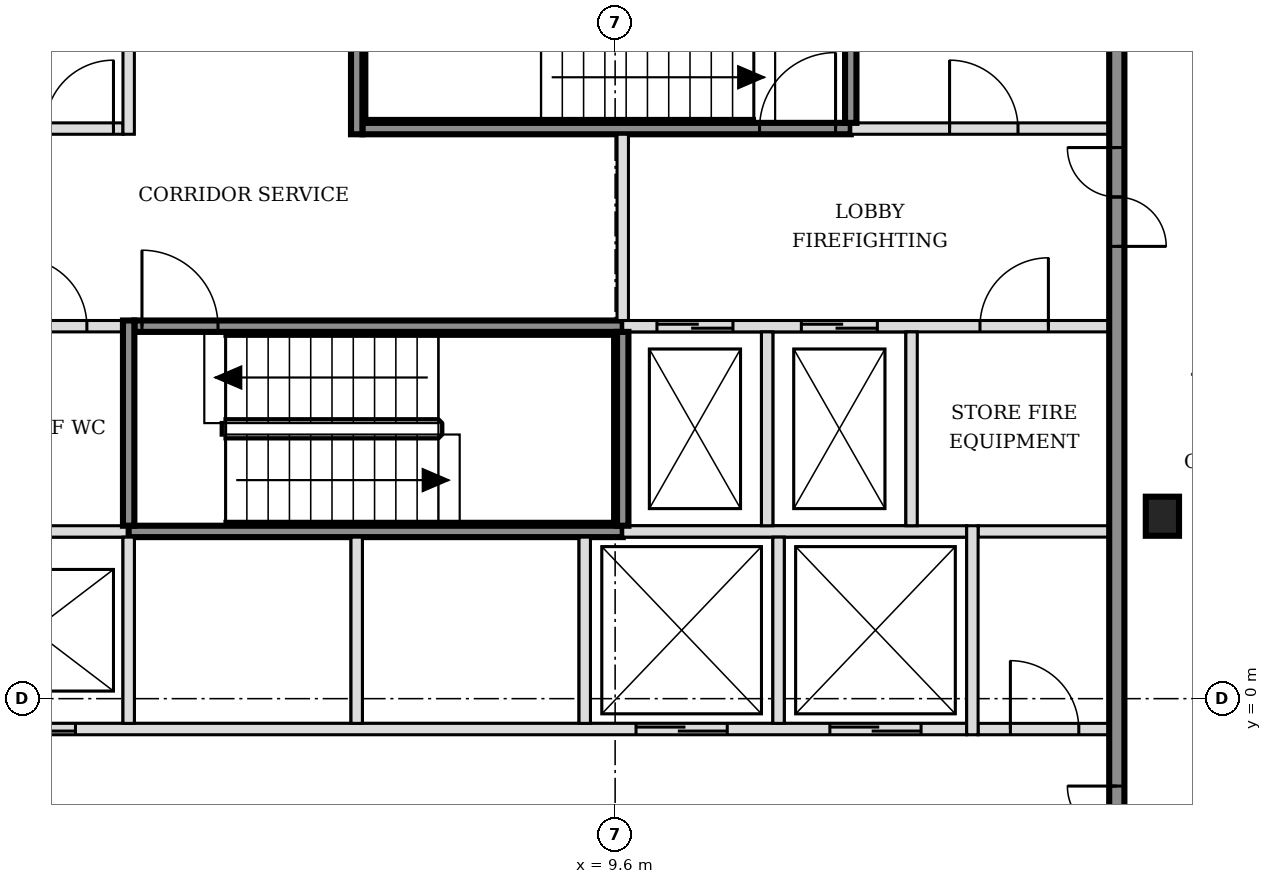
"""IFC4 building model, lengths in metres.
Left out: names, types, materials, properties, quantities, classifications, styles, units other than length and angle.
Written with IfcOpenShell. Run it as: python <this file> out.ifc"""

import sys

from ifc_helpers import new_model, si_unit, direction, frame, frame_2d, origin, origin_2d, place, context, subcontext, project, spatial, rectangle, i_section, extrude, element, fill, save


model = new_model("IFC4")
c1 = context("Model", 3, precision=1e-05, world=origin(), true_north=direction((0.0, 1.0)))
c2 = subcontext(c1, "Body", "Model", "MODEL_VIEW")
j1 = project(units=[si_unit("LENGTHUNIT", "METRE"), si_unit("PLANEANGLEUNIT", "RADIAN")], contexts=[c1])
p1 = place(None, origin())
s1 = spatial("IfcSite", under=j1, at=p1, CompositionType="ELEMENT")
p2 = place(p1, origin())
s2 = spatial("IfcBuilding", under=s1, at=p2, CompositionType="ELEMENT")
p3 = place(p2, frame((0.0, 0.0, 65.4)))
s3 = spatial("IfcBuildingStorey", under=s2, at=p3, CompositionType="ELEMENT", Elevation=65.4)
p4 = place(p3, frame((16.8, 2.4, -0.15), z_axis=(0.0, 0.0, 1.0), x_axis=(1.0, 0.0, 0.0)))
e1 = element("IfcColumn", 1, at=p4, inside=s3, PredefinedType="COLUMN", context=c2, shape_type="SweptSolid", body=[
    extrude(i_section(OverallWidth=0.437, OverallDepth=0.514, WebThickness=0.061, FlangeThickness=0.097, FilletRadius=0.015, at=origin_2d()), origin(), (0.0, 0.0, 1.0), 3.6),
])
p5 = place(p3, frame((-1.7, -0.4, 0.0), z_axis=(0.0, 0.0, 1.0), x_axis=(1.0, 0.0, 0.0)))
e2 = element("IfcWall", 2, at=p5, inside=s3, PredefinedType="SOLIDWALL", context=c2, shape_type="SweptSolid", body=[
    extrude(rectangle(XDim=15.925, YDim=0.15, at=frame_2d((7.962, 0.0))), origin(), (0.0, 0.0, 1.0), 3.45),
])
p6 = place(p5, frame((0.6, 0.0, 0.0)))
e3 = element("IfcOpeningElement", 3, at=p6, cuts=e2, PredefinedType="OPENING", context=c2, shape_type="SweptSolid", body=[
    extrude(rectangle(XDim=1.1, YDim=2.1, at=frame_2d((0.55, 1.05))), frame((0.0, 0.085, 0.0), z_axis=(0.0, -1.0, 0.0), x_axis=(1.0, 0.0, 0.0)), (0.0, 0.0, 1.0), 0.17),
])
p7 = place(p5, frame((3.1, 0.0, 0.0)))
e4 = element("IfcOpeningElement", 4, at=p7, cuts=e2, PredefinedType="OPENING", context=c2, shape_type="SweptSolid", body=[
    extrude(rectangle(XDim=1.1, YDim=2.1, at=frame_2d((0.55, 1.05))), frame((0.0, 0.085, 0.0), z_axis=(0.0, -1.0, 0.0), x_axis=(1.0, 0.0, 0.0)), (0.0, 0.0, 1.0), 0.17),
])
p8 = place(p5, frame((11.575, 0.0, 0.0)))
e5 = element("IfcOpeningElement", 5, at=p8, cuts=e2, PredefinedType="OPENING", context=c2, shape_type="SweptSolid", body=[
    extrude(rectangle(XDim=1.2, YDim=2.1, at=frame_2d((0.6, 1.05))), frame((0.0, 0.085, 0.0), z_axis=(0.0, -1.0, 0.0), x_axis=(1.0, 0.0, 0.0)), (0.0, 0.0, 1.0), 0.17),
])
p9 = place(p5, frame((14.125, 0.0, 0.0)))
e6 = element("IfcOpeningElement", 6, at=p9, cuts=e2, PredefinedType="OPENING", context=c2, shape_type="SweptSolid", body=[
    extrude(rectangle(XDim=1.2, YDim=2.1, at=frame_2d((0.6, 1.05))), frame((0.0, 0.085, 0.0), z_axis=(0.0, -1.0, 0.0), x_axis=(1.0, 0.0, 0.0)), (0.0, 0.0, 1.0), 0.17),
])
p10 = place(p3, frame((14.375, -0.4, 0.0), z_axis=(0.0, 0.0, 1.0), x_axis=(1.0, 0.0, 0.0)))
e7 = element("IfcWall", 7, at=p10, inside=s3, PredefinedType="PARTITIONING", context=c2, shape_type="SweptSolid", body=[
    extrude(rectangle(XDim=1.725, YDim=0.15, at=frame_2d((0.863, 0.0))), origin(), (0.0, 0.0, 1.0), 3.45),
])
p11 = place(p10, frame((0.425, 0.0, 0.0)))
e8 = element("IfcOpeningElement", 8, at=p11, cuts=e7, PredefinedType="OPENING", context=c2, shape_type="SweptSolid", body=[
    extrude(rectangle(XDim=0.9, YDim=2.1, at=frame_2d((0.45, 1.05))), frame((0.0, 0.085, 0.0), z_axis=(0.0, -1.0, 0.0), x_axis=(1.0, 0.0, 0.0)), (0.0, 0.0, 1.0), 0.17),
])
p12 = place(p3, frame((-1.7, 2.2, 0.0), z_axis=(0.0, 0.0, 1.0), x_axis=(1.0, 0.0, 0.0)))
e9 = element("IfcWall", 9, at=p12, inside=s3, PredefinedType="SOLIDWALL", context=c2, shape_type="SweptSolid", body=[
    extrude(rectangle(XDim=4.9, YDim=0.15, at=frame_2d((2.45, 0.0))), origin(), (0.0, 0.0, 1.0), 3.45),
])
p13 = place(p3, frame((3.2, 2.2, 0.0), z_axis=(0.0, 0.0, 1.0), x_axis=(1.0, 0.0, 0.0)))
e10 = element("IfcWall", 10, at=p13, inside=s3, PredefinedType="SOLIDWALL", context=c2, shape_type="SweptSolid", body=[
    extrude(rectangle(XDim=6.5, YDim=0.15, at=frame_2d((3.25, 0.0))), origin(), (0.0, 0.0, 1.0), 3.45),
])
p14 = place(p3, frame((9.7, 2.2, 0.0), z_axis=(0.0, 0.0, 1.0), x_axis=(1.0, 0.0, 0.0)))
e11 = element("IfcWall", 11, at=p14, inside=s3, PredefinedType="SOLIDWALL", context=c2, shape_type="SweptSolid", body=[
    extrude(rectangle(XDim=4.525, YDim=0.15, at=frame_2d((2.263, 0.0))), origin(), (0.0, 0.0, 1.0), 3.45),
])
p15 = place(p3, frame((14.375, 2.2, 0.0), z_axis=(0.0, 0.0, 1.0), x_axis=(1.0, 0.0, 0.0)))
e12 = element("IfcWall", 12, at=p15, inside=s3, PredefinedType="PARTITIONING", context=c2, shape_type="SweptSolid", body=[
    extrude(rectangle(XDim=1.725, YDim=0.15, at=frame_2d((0.863, 0.0))), origin(), (0.0, 0.0, 1.0), 3.45),
])
p16 = place(p3, frame((-1.7, 4.9, 0.0), z_axis=(0.0, 0.0, 1.0), x_axis=(1.0, 0.0, 0.0)))
e13 = element("IfcWall", 13, at=p16, inside=s3, PredefinedType="PARTITIONING", context=c2, shape_type="SweptSolid", body=[
    extrude(rectangle(XDim=4.825, YDim=0.15, at=frame_2d((2.413, 0.0))), origin(), (0.0, 0.0, 1.0), 3.45),
])
p17 = place(p16, frame((0.95, 0.0, 0.0)))
e14 = element("IfcOpeningElement", 14, at=p17, cuts=e13, PredefinedType="OPENING", context=c2, shape_type="SweptSolid", body=[
    extrude(rectangle(XDim=0.9, YDim=2.1, at=frame_2d((0.45, 1.05))), frame((0.0, 0.085, 0.0), z_axis=(0.0, -1.0, 0.0), x_axis=(1.0, 0.0, 0.0)), (0.0, 0.0, 1.0), 0.17),
])
p18 = place(p16, frame((3.45, 0.0, 0.0)))
e15 = element("IfcOpeningElement", 15, at=p18, cuts=e13, PredefinedType="OPENING", context=c2, shape_type="SweptSolid", body=[
    extrude(rectangle(XDim=0.9, YDim=2.1, at=frame_2d((0.45, 1.05))), frame((0.0, 0.085, 0.0), z_axis=(0.0, -1.0, 0.0), x_axis=(1.0, 0.0, 0.0)), (0.0, 0.0, 1.0), 0.17),
])
p19 = place(p3, frame((3.275, 4.9, 0.0), z_axis=(0.0, 0.0, 1.0), x_axis=(1.0, 0.0, 0.0)))
e16 = element("IfcWall", 16, at=p19, inside=s3, PredefinedType="SOLIDWALL", context=c2, shape_type="SweptSolid", body=[
    extrude(rectangle(XDim=6.425, YDim=0.15, at=frame_2d((3.212, 0.0))), origin(), (0.0, 0.0, 1.0), 3.45),
])
p20 = place(p19, frame((0.1, 0.0, 0.0)))
e17 = element("IfcOpeningElement", 17, at=p20, cuts=e16, PredefinedType="OPENING", context=c2, shape_type="SweptSolid", body=[
    extrude(rectangle(XDim=1.0, YDim=2.1, at=frame_2d((0.5, 1.05))), frame((0.0, 0.085, 0.0), z_axis=(0.0, -1.0, 0.0), x_axis=(1.0, 0.0, 0.0)), (0.0, 0.0, 1.0), 0.17),
])
p21 = place(p3, frame((9.7, 4.9, 0.0), z_axis=(0.0, 0.0, 1.0), x_axis=(1.0, 0.0, 0.0)))
e18 = element("IfcWall", 18, at=p21, inside=s3, PredefinedType="SOLIDWALL", context=c2, shape_type="SweptSolid", body=[
    extrude(rectangle(XDim=6.4, YDim=0.15, at=frame_2d((3.2, 0.0))), origin(), (0.0, 0.0, 1.0), 3.45),
])
p22 = place(p21, frame((0.45, 0.0, 0.0)))
e19 = element("IfcOpeningElement", 19, at=p22, cuts=e18, PredefinedType="OPENING", context=c2, shape_type="SweptSolid", body=[
    extrude(rectangle(XDim=1.0, YDim=2.1, at=frame_2d((0.5, 1.05))), frame((0.0, 0.085, 0.0), z_axis=(0.0, -1.0, 0.0), x_axis=(1.0, 0.0, 0.0)), (0.0, 0.0, 1.0), 0.17),
])
p23 = place(p21, frame((2.35, 0.0, 0.0)))
e20 = element("IfcOpeningElement", 20, at=p23, cuts=e18, PredefinedType="OPENING", context=c2, shape_type="SweptSolid", body=[
    extrude(rectangle(XDim=1.0, YDim=2.1, at=frame_2d((0.5, 1.05))), frame((0.0, 0.085, 0.0), z_axis=(0.0, -1.0, 0.0), x_axis=(1.0, 0.0, 0.0)), (0.0, 0.0, 1.0), 0.17),
])
p24 = place(p21, frame((4.7, 0.0, 0.0)))
e21 = element("IfcOpeningElement", 21, at=p24, cuts=e18, PredefinedType="OPENING", context=c2, shape_type="SweptSolid", body=[
    extrude(rectangle(XDim=0.9, YDim=2.1, at=frame_2d((0.45, 1.05))), frame((0.0, 0.085, 0.0), z_axis=(0.0, -1.0, 0.0), x_axis=(1.0, 0.0, 0.0)), (0.0, 0.0, 1.0), 0.17),
])
p25 = place(p3, frame((-1.7, 7.5, 0.0), z_axis=(0.0, 0.0, 1.0), x_axis=(1.0, 0.0, 0.0)))
e22 = element("IfcWall", 22, at=p25, inside=s3, PredefinedType="PARTITIONING", context=c2, shape_type="SweptSolid", body=[
    extrude(rectangle(XDim=4.825, YDim=0.15, at=frame_2d((2.413, 0.0))), origin(), (0.0, 0.0, 1.0), 3.45),
])
p26 = place(p25, frame((0.1, 0.0, 0.0)))
e23 = element("IfcOpeningElement", 23, at=p26, cuts=e22, PredefinedType="OPENING", context=c2, shape_type="SweptSolid", body=[
    extrude(rectangle(XDim=0.9, YDim=2.1, at=frame_2d((0.45, 1.05))), frame((0.0, 0.085, 0.0), z_axis=(0.0, -1.0, 0.0), x_axis=(1.0, 0.0, 0.0)), (0.0, 0.0, 1.0), 0.17),
])
p27 = place(p25, frame((1.95, 0.0, 0.0)))
e24 = element("IfcOpeningElement", 24, at=p27, cuts=e22, PredefinedType="OPENING", context=c2, shape_type="SweptSolid", body=[
    extrude(rectangle(XDim=0.9, YDim=2.1, at=frame_2d((0.45, 1.05))), frame((0.0, 0.085, 0.0), z_axis=(0.0, -1.0, 0.0), x_axis=(1.0, 0.0, 0.0)), (0.0, 0.0, 1.0), 0.17),
])
p28 = place(p25, frame((3.8, 0.0, 0.0)))
e25 = element("IfcOpeningElement", 25, at=p28, cuts=e22, PredefinedType="OPENING", context=c2, shape_type="SweptSolid", body=[
    extrude(rectangle(XDim=0.9, YDim=2.1, at=frame_2d((0.45, 1.05))), frame((0.0, 0.085, 0.0), z_axis=(0.0, -1.0, 0.0), x_axis=(1.0, 0.0, 0.0)), (0.0, 0.0, 1.0), 0.17),
])
p29 = place(p3, frame((6.275, 7.5, 0.0), z_axis=(0.0, 0.0, 1.0), x_axis=(1.0, 0.0, 0.0)))
e26 = element("IfcWall", 26, at=p29, inside=s3, PredefinedType="SOLIDWALL", context=c2, shape_type="SweptSolid", body=[
    extrude(rectangle(XDim=6.425, YDim=0.15, at=frame_2d((3.212, 0.0))), origin(), (0.0, 0.0, 1.0), 3.45),
])
p30 = place(p29, frame((5.225, 0.0, 0.0)))
e27 = element("IfcOpeningElement", 27, at=p30, cuts=e26, PredefinedType="OPENING", context=c2, shape_type="SweptSolid", body=[
    extrude(rectangle(XDim=1.0, YDim=2.1, at=frame_2d((0.5, 1.05))), frame((0.0, 0.085, 0.0), z_axis=(0.0, -1.0, 0.0), x_axis=(1.0, 0.0, 0.0)), (0.0, 0.0, 1.0), 0.17),
])
p31 = place(p3, frame((12.7, 7.5, 0.0), z_axis=(0.0, 0.0, 1.0), x_axis=(1.0, 0.0, 0.0)))
e28 = element("IfcWall", 28, at=p31, inside=s3, PredefinedType="SOLIDWALL", context=c2, shape_type="SweptSolid", body=[
    extrude(rectangle(XDim=3.4, YDim=0.15, at=frame_2d((1.7, 0.0))), origin(), (0.0, 0.0, 1.0), 3.45),
])
p32 = place(p31, frame((1.3, 0.0, 0.0)))
e29 = element("IfcOpeningElement", 29, at=p32, cuts=e28, PredefinedType="OPENING", context=c2, shape_type="SweptSolid", body=[
    extrude(rectangle(XDim=0.9, YDim=2.1, at=frame_2d((0.45, 1.05))), frame((0.0, 0.085, 0.0), z_axis=(0.0, -1.0, 0.0), x_axis=(1.0, 0.0, 0.0)), (0.0, 0.0, 1.0), 0.17),
])
p33 = place(p3, frame((3.2, -0.325, 0.0), z_axis=(0.0, 0.0, 1.0), x_axis=(0.0, 1.0, 0.0)))
e30 = element("IfcWall", 30, at=p33, inside=s3, PredefinedType="SOLIDWALL", context=c2, shape_type="SweptSolid", body=[
    extrude(rectangle(XDim=2.45, YDim=0.15, at=frame_2d((1.225, 0.0))), origin(), (0.0, 0.0, 1.0), 3.45),
])
p34 = place(p3, frame((3.2, 2.275, 0.0), z_axis=(0.0, 0.0, 1.0), x_axis=(0.0, 1.0, 0.0)))
e31 = element("IfcWall", 31, at=p34, inside=s3, PredefinedType="SOLIDWALL", context=c2, shape_type="SweptSolid", body=[
    extrude(rectangle(XDim=2.7, YDim=0.15, at=frame_2d((1.35, 0.0))), origin(), (0.0, 0.0, 1.0), 3.45),
])
p35 = place(p3, frame((3.2, 7.425, 0.0), z_axis=(0.0, 0.0, 1.0), x_axis=(0.0, 1.0, 0.0)))
e32 = element("IfcWall", 32, at=p35, inside=s3, PredefinedType="PARTITIONING", context=c2, shape_type="SweptSolid", body=[
    extrude(rectangle(XDim=2.675, YDim=0.15, at=frame_2d((1.337, 0.0))), origin(), (0.0, 0.0, 1.0), 3.45),
])
p36 = place(p3, frame((6.2, -0.325, 0.0), z_axis=(0.0, 0.0, 1.0), x_axis=(0.0, 1.0, 0.0)))
e33 = element("IfcWall", 33, at=p36, inside=s3, PredefinedType="SOLIDWALL", context=c2, shape_type="SweptSolid", body=[
    extrude(rectangle(XDim=2.45, YDim=0.15, at=frame_2d((1.225, 0.0))), origin(), (0.0, 0.0, 1.0), 3.45),
])
p37 = place(p3, frame((6.2, 7.425, 0.0), z_axis=(0.0, 0.0, 1.0), x_axis=(0.0, 1.0, 0.0)))
e34 = element("IfcWall", 34, at=p37, inside=s3, PredefinedType="SOLIDWALL", context=c2, shape_type="SweptSolid", body=[
    extrude(rectangle(XDim=2.675, YDim=0.15, at=frame_2d((1.337, 0.0))), origin(), (0.0, 0.0, 1.0), 3.45),
])
p38 = place(p3, frame((9.2, -0.325, 0.0), z_axis=(0.0, 0.0, 1.0), x_axis=(0.0, 1.0, 0.0)))
e35 = element("IfcWall", 35, at=p38, inside=s3, PredefinedType="SOLIDWALL", context=c2, shape_type="SweptSolid", body=[
    extrude(rectangle(XDim=2.45, YDim=0.15, at=frame_2d((1.225, 0.0))), origin(), (0.0, 0.0, 1.0), 3.45),
])
p39 = place(p3, frame((9.7, 2.275, 0.0), z_axis=(0.0, 0.0, 1.0), x_axis=(0.0, 1.0, 0.0)))
e36 = element("IfcWall", 36, at=p39, inside=s3, PredefinedType="SOLIDWALL", context=c2, shape_type="SweptSolid", body=[
    extrude(rectangle(XDim=2.55, YDim=0.15, at=frame_2d((1.275, 0.0))), origin(), (0.0, 0.0, 1.0), 3.45),
])
p40 = place(p3, frame((9.7, 4.975, 0.0), z_axis=(0.0, 0.0, 1.0), x_axis=(0.0, 1.0, 0.0)))
e37 = element("IfcWall", 37, at=p40, inside=s3, PredefinedType="SOLIDWALL", context=c2, shape_type="SweptSolid", body=[
    extrude(rectangle(XDim=2.45, YDim=0.15, at=frame_2d((1.225, 0.0))), origin(), (0.0, 0.0, 1.0), 3.45),
])
p41 = place(p3, frame((11.6, 2.275, 0.0), z_axis=(0.0, 0.0, 1.0), x_axis=(0.0, 1.0, 0.0)))
e38 = element("IfcWall", 38, at=p41, inside=s3, PredefinedType="SOLIDWALL", context=c2, shape_type="SweptSolid", body=[
    extrude(rectangle(XDim=2.55, YDim=0.15, at=frame_2d((1.275, 0.0))), origin(), (0.0, 0.0, 1.0), 3.45),
])
p42 = place(p3, frame((11.75, -0.325, 0.0), z_axis=(0.0, 0.0, 1.0), x_axis=(0.0, 1.0, 0.0)))
e39 = element("IfcWall", 39, at=p42, inside=s3, PredefinedType="SOLIDWALL", context=c2, shape_type="SweptSolid", body=[
    extrude(rectangle(XDim=2.45, YDim=0.15, at=frame_2d((1.225, 0.0))), origin(), (0.0, 0.0, 1.0), 3.45),
])
p43 = place(p3, frame((12.7, 7.575, 0.0), z_axis=(0.0, 0.0, 1.0), x_axis=(0.0, 1.0, 0.0)))
e40 = element("IfcWall", 40, at=p43, inside=s3, PredefinedType="SOLIDWALL", context=c2, shape_type="SweptSolid", body=[
    extrude(rectangle(XDim=2.525, YDim=0.15, at=frame_2d((1.263, 0.0))), origin(), (0.0, 0.0, 1.0), 3.45),
])
p44 = place(p3, frame((13.5, 2.275, 0.0), z_axis=(0.0, 0.0, 1.0), x_axis=(0.0, 1.0, 0.0)))
e41 = element("IfcWall", 41, at=p44, inside=s3, PredefinedType="SOLIDWALL", context=c2, shape_type="SweptSolid", body=[
    extrude(rectangle(XDim=2.55, YDim=0.15, at=frame_2d((1.275, 0.0))), origin(), (0.0, 0.0, 1.0), 3.45),
])
p45 = place(p3, frame((14.3, -0.475, 0.0), z_axis=(0.0, 0.0, 1.0), x_axis=(0.0, 1.0, 0.0)))
e42 = element("IfcWall", 42, at=p45, inside=s3, PredefinedType="SOLIDWALL", context=c2, shape_type="SweptSolid", body=[
    extrude(rectangle(XDim=2.75, YDim=0.15, at=frame_2d((1.375, 0.0))), origin(), (0.0, 0.0, 1.0), 3.45),
])
p46 = place(p3, frame((16.2, -5.5, 0.0), z_axis=(0.0, 0.0, 1.0), x_axis=(0.0, 1.0, 0.0)))
e43 = element("IfcWall", 43, at=p46, inside=s3, PredefinedType="SOLIDWALL", context=c2, shape_type="SweptSolid", body=[
    extrude(rectangle(XDim=15.8, YDim=0.2, at=frame_2d((7.9, 0.0))), origin(), (0.0, 0.0, 1.0), 3.45),
])
p47 = place(p46, frame((3.05, 0.0, 0.0)))
e44 = element("IfcOpeningElement", 44, at=p47, cuts=e43, PredefinedType="OPENING", context=c2, shape_type="SweptSolid", body=[
    extrude(rectangle(XDim=1.3, YDim=2.1, at=frame_2d((0.65, 1.05))), frame((0.0, 0.11, 0.0), z_axis=(0.0, -1.0, 0.0), x_axis=(1.0, 0.0, 0.0)), (0.0, 0.0, 1.0), 0.22),
])
p48 = place(p46, frame((11.45, 0.0, 0.0)))
e45 = element("IfcOpeningElement", 45, at=p48, cuts=e43, PredefinedType="OPENING", context=c2, shape_type="SweptSolid", body=[
    extrude(rectangle(XDim=1.3, YDim=2.1, at=frame_2d((0.65, 1.05))), frame((0.0, 0.11, 0.0), z_axis=(0.0, -1.0, 0.0), x_axis=(1.0, 0.0, 0.0)), (0.0, 0.0, 1.0), 0.22),
])
p49 = place(p7, origin())
e46 = element("IfcDoor", 46, at=p49, inside=s3, OperationType="DOUBLE_DOOR_SLIDING", PredefinedType="DOOR", context=c2, shape_type="SweptSolid", body=[
    extrude(rectangle(XDim=1.1, YDim=2.1, at=frame_2d((0.55, 1.05))), frame((0.0, 0.025, 0.0), z_axis=(0.0, -1.0, 0.0), x_axis=(1.0, 0.0, 0.0)), (0.0, 0.0, 1.0), 0.05),
])
fill(e4, e46)
p50 = place(p8, origin())
e47 = element("IfcDoor", 47, at=p50, inside=s3, OperationType="DOUBLE_DOOR_SLIDING", PredefinedType="DOOR", context=c2, shape_type="SweptSolid", body=[
    extrude(rectangle(XDim=1.2, YDim=2.1, at=frame_2d((0.6, 1.05))), frame((0.0, 0.025, 0.0), z_axis=(0.0, -1.0, 0.0), x_axis=(1.0, 0.0, 0.0)), (0.0, 0.0, 1.0), 0.05),
])
fill(e5, e47)
p51 = place(p9, origin())
e48 = element("IfcDoor", 48, at=p51, inside=s3, OperationType="DOUBLE_DOOR_SLIDING", PredefinedType="DOOR", context=c2, shape_type="SweptSolid", body=[
    extrude(rectangle(XDim=1.2, YDim=2.1, at=frame_2d((0.6, 1.05))), frame((0.0, 0.025, 0.0), z_axis=(0.0, -1.0, 0.0), x_axis=(1.0, 0.0, 0.0)), (0.0, 0.0, 1.0), 0.05),
])
fill(e6, e48)
p52 = place(p22, origin())
e49 = element("IfcDoor", 49, at=p52, inside=s3, OperationType="DOUBLE_DOOR_SLIDING", PredefinedType="DOOR", context=c2, shape_type="SweptSolid", body=[
    extrude(rectangle(XDim=1.0, YDim=2.1, at=frame_2d((0.5, 1.05))), frame((0.0, 0.025, 0.0), z_axis=(0.0, -1.0, 0.0), x_axis=(1.0, 0.0, 0.0)), (0.0, 0.0, 1.0), 0.05),
])
fill(e19, e49)
p53 = place(p23, origin())
e50 = element("IfcDoor", 50, at=p53, inside=s3, OperationType="DOUBLE_DOOR_SLIDING", PredefinedType="DOOR", context=c2, shape_type="SweptSolid", body=[
    extrude(rectangle(XDim=1.0, YDim=2.1, at=frame_2d((0.5, 1.05))), frame((0.0, 0.025, 0.0), z_axis=(0.0, -1.0, 0.0), x_axis=(1.0, 0.0, 0.0)), (0.0, 0.0, 1.0), 0.05),
])
fill(e20, e50)
p54 = place(p20, origin())
e51 = element("IfcDoor", 51, at=p54, inside=s3, OperationType="SINGLE_SWING_LEFT", PredefinedType="DOOR", context=c2, shape_type="SweptSolid", body=[
    extrude(rectangle(XDim=1.0, YDim=2.1, at=frame_2d((0.5, 1.05))), frame((0.0, 0.025, 0.0), z_axis=(0.0, -1.0, 0.0), x_axis=(1.0, 0.0, 0.0)), (0.0, 0.0, 1.0), 0.05),
])
fill(e17, e51)
p55 = place(p30, origin())
e52 = element("IfcDoor", 52, at=p55, inside=s3, OperationType="SINGLE_SWING_RIGHT", PredefinedType="DOOR", context=c2, shape_type="SweptSolid", body=[
    extrude(rectangle(XDim=1.0, YDim=2.1, at=frame_2d((0.5, 1.05))), frame((0.0, 0.025, 0.0), z_axis=(0.0, -1.0, 0.0), x_axis=(1.0, 0.0, 0.0)), (0.0, 0.0, 1.0), 0.05),
])
fill(e27, e52)
p56 = place(p47, origin())
e53 = element("IfcDoor", 53, at=p56, inside=s3, OperationType="DOUBLE_DOOR_SINGLE_SWING", PredefinedType="DOOR", context=c2, shape_type="SweptSolid", body=[
    extrude(rectangle(XDim=1.3, YDim=2.1, at=frame_2d((0.65, 1.05))), frame((0.0, 0.025, 0.0), z_axis=(0.0, -1.0, 0.0), x_axis=(1.0, 0.0, 0.0)), (0.0, 0.0, 1.0), 0.05),
])
fill(e44, e53)
p57 = place(p48, origin())
e54 = element("IfcDoor", 54, at=p57, inside=s3, OperationType="DOUBLE_DOOR_SINGLE_SWING", PredefinedType="DOOR", context=c2, shape_type="SweptSolid", body=[
    extrude(rectangle(XDim=1.3, YDim=2.1, at=frame_2d((0.65, 1.05))), frame((0.0, 0.025, 0.0), z_axis=(0.0, -1.0, 0.0), x_axis=(1.0, 0.0, 0.0)), (0.0, 0.0, 1.0), 0.05),
])
fill(e45, e54)
p58 = place(p11, origin())
e55 = element("IfcDoor", 55, at=p58, inside=s3, OperationType="SINGLE_SWING_LEFT", PredefinedType="DOOR", context=c2, shape_type="SweptSolid", body=[
    extrude(rectangle(XDim=0.9, YDim=2.1, at=frame_2d((0.45, 1.05))), frame((0.0, 0.025, 0.0), z_axis=(0.0, -1.0, 0.0), x_axis=(1.0, 0.0, 0.0)), (0.0, 0.0, 1.0), 0.05),
])
fill(e8, e55)
p59 = place(p24, origin())
e56 = element("IfcDoor", 56, at=p59, inside=s3, OperationType="SINGLE_SWING_RIGHT", PredefinedType="DOOR", context=c2, shape_type="SweptSolid", body=[
    extrude(rectangle(XDim=0.9, YDim=2.1, at=frame_2d((0.45, 1.05))), frame((0.0, 0.025, 0.0), z_axis=(0.0, -1.0, 0.0), x_axis=(1.0, 0.0, 0.0)), (0.0, 0.0, 1.0), 0.05),
])
fill(e21, e56)
p60 = place(p32, origin())
e57 = element("IfcDoor", 57, at=p60, inside=s3, OperationType="SINGLE_SWING_LEFT", PredefinedType="DOOR", context=c2, shape_type="SweptSolid", body=[
    extrude(rectangle(XDim=0.9, YDim=2.1, at=frame_2d((0.45, 1.05))), frame((0.0, 0.025, 0.0), z_axis=(0.0, -1.0, 0.0), x_axis=(1.0, 0.0, 0.0)), (0.0, 0.0, 1.0), 0.05),
])
fill(e29, e57)
p61 = place(p18, origin())
e58 = element("IfcDoor", 58, at=p61, inside=s3, OperationType="SINGLE_SWING_LEFT", PredefinedType="DOOR", context=c2, shape_type="SweptSolid", body=[
    extrude(rectangle(XDim=0.9, YDim=2.1, at=frame_2d((0.45, 1.05))), frame((0.0, 0.025, 0.0), z_axis=(0.0, -1.0, 0.0), x_axis=(1.0, 0.0, 0.0)), (0.0, 0.0, 1.0), 0.05),
])
fill(e15, e58)
p62 = place(p28, origin())
e59 = element("IfcDoor", 59, at=p62, inside=s3, OperationType="SINGLE_SWING_RIGHT", PredefinedType="DOOR", context=c2, shape_type="SweptSolid", body=[
    extrude(rectangle(XDim=0.9, YDim=2.1, at=frame_2d((0.45, 1.05))), frame((0.0, 0.025, 0.0), z_axis=(0.0, -1.0, 0.0), x_axis=(1.0, 0.0, 0.0)), (0.0, 0.0, 1.0), 0.05),
])
fill(e25, e59)
save(model, sys.argv[1])
